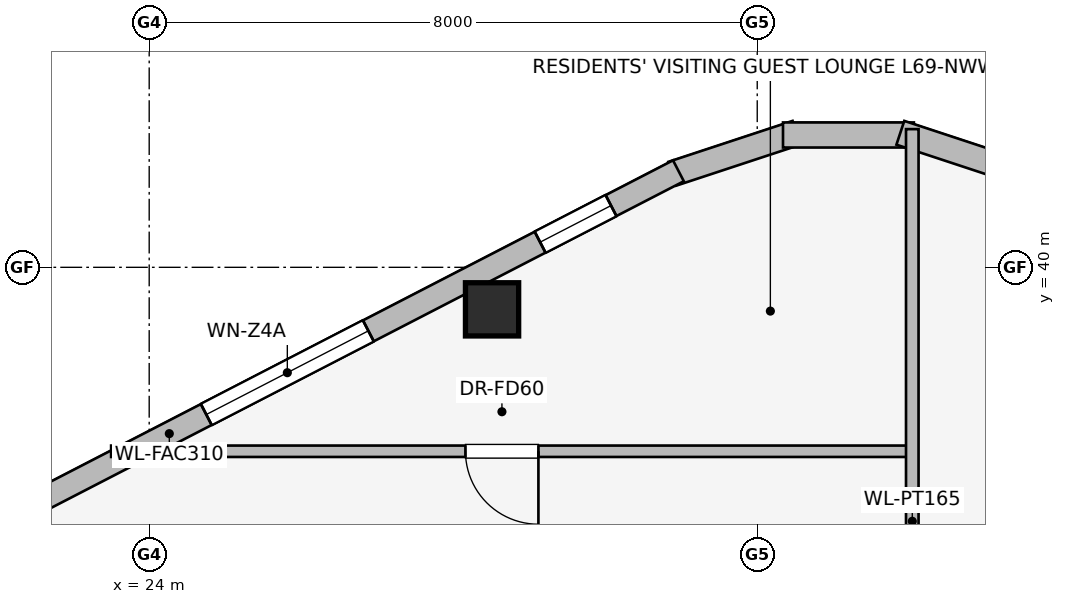
"""IFC4 building model, lengths in metres.
Left out: names, types, materials, properties, quantities, classifications, styles, units other than length and angle.
Written with IfcOpenShell. Run it as: python <this file> out.ifc"""

import sys

from ifc_helpers import new_model, si_unit, direction, frame, frame_2d, origin, origin_2d, place, context, subcontext, project, spatial, rectangle, extrude, element, fill, save


model = new_model("IFC4")
c1 = context("Model", 3, precision=1e-05, world=origin(), true_north=direction((0.0, 1.0)))
c2 = subcontext(c1, "Body", "Model", "MODEL_VIEW")
j1 = project(units=[si_unit("LENGTHUNIT", "METRE"), si_unit("PLANEANGLEUNIT", "RADIAN")], contexts=[c1])
p1 = place(None, origin())
s1 = spatial("IfcSite", under=j1, at=p1, CompositionType="ELEMENT")
p2 = place(p1, origin())
s2 = spatial("IfcBuilding", under=s1, at=p2, CompositionType="ELEMENT")
p3 = place(p2, frame((0.0, 0.0, 252.55)))
s3 = spatial("IfcBuildingStorey", under=s2, at=p3, CompositionType="ELEMENT", Elevation=252.55)
p4 = place(p3, frame((28.511, 39.447, 0.0), z_axis=(0.0, 0.0, 1.0), x_axis=(1.0, 0.0, 0.0)))
e1 = element("IfcColumn", 1, at=p4, inside=s3, PredefinedType="COLUMN", context=c2, shape_type="SweptSolid", body=[
    extrude(rectangle(XDim=0.7, YDim=0.7, at=origin_2d()), origin(), (0.0, 0.0, 1.0), 3.55),
])
p5 = place(p3, frame((30.882, 41.231, 0.0), z_axis=(0.0, 0.0, 1.0), x_axis=(0.949713440491, 0.313120393699, 0.0)))
e2 = element("IfcWall", 2, at=p5, inside=s3, PredefinedType="STANDARD", context=c2, shape_type="SweptSolid", body=[
    extrude(rectangle(XDim=1.722, YDim=0.33, at=frame_2d((0.861, 0.0))), origin(), (0.0, 0.0, 1.0), 3.29),
])
p6 = place(p3, frame((32.339, 41.741, 0.0), z_axis=(0.0, 0.0, 1.0), x_axis=(1.0, 0.0, 0.0)))
e3 = element("IfcWall", 3, at=p6, inside=s3, PredefinedType="STANDARD", context=c2, shape_type="SweptSolid", body=[
    extrude(rectangle(XDim=1.722, YDim=0.33, at=frame_2d((0.861, 0.0))), origin(), (0.0, 0.0, 1.0), 3.29),
])
p7 = place(p3, frame((33.883, 41.77, 0.0), z_axis=(0.0, 0.0, 1.0), x_axis=(0.949713440491, -0.313120393699, 0.0)))
e4 = element("IfcWall", 4, at=p7, inside=s3, PredefinedType="STANDARD", context=c2, shape_type="SweptSolid", body=[
    extrude(rectangle(XDim=1.722, YDim=0.33, at=frame_2d((0.861, 0.0))), origin(), (0.0, 0.0, 1.0), 3.29),
])
p8 = place(p3, frame((17.566, 34.354, 0.0), z_axis=(0.0, 0.0, 1.0), x_axis=(0.888581481622, 0.458718814218, 0.0)))
e5 = element("IfcWall", 5, at=p8, inside=s3, PredefinedType="STANDARD", context=c2, shape_type="SweptSolid", body=[
    extrude(rectangle(XDim=15.077, YDim=0.31, at=frame_2d((7.539, 0.0))), origin(), (0.0, 0.0, 1.0), 3.29),
])
p9 = place(p8, frame((0.998, 0.0, 0.75)))
e6 = element("IfcOpeningElement", 6, at=p9, cuts=e5, PredefinedType="OPENING", context=c2, shape_type="SweptSolid", body=[
    extrude(rectangle(XDim=1.05, YDim=1.4, at=frame_2d((0.525, 0.7))), frame((0.0, 0.165, 0.0), z_axis=(0.0, -1.0, 0.0), x_axis=(1.0, 0.0, 0.0)), (0.0, 0.0, 1.0), 0.33),
])
p10 = place(p8, frame((4.403, 0.0, 0.75)))
e7 = element("IfcOpeningElement", 7, at=p10, cuts=e5, PredefinedType="OPENING", context=c2, shape_type="SweptSolid", body=[
    extrude(rectangle(XDim=1.05, YDim=1.4, at=frame_2d((0.525, 0.7))), frame((0.0, 0.165, 0.0), z_axis=(0.0, -1.0, 0.0), x_axis=(1.0, 0.0, 0.0)), (0.0, 0.0, 1.0), 0.33),
])
p11 = place(p8, frame((8.086, 0.0, 0.75)))
e8 = element("IfcOpeningElement", 8, at=p11, cuts=e5, PredefinedType="OPENING", context=c2, shape_type="SweptSolid", body=[
    extrude(rectangle(XDim=2.4, YDim=1.6, at=frame_2d((1.2, 0.8))), frame((0.0, 0.165, 0.0), z_axis=(0.0, -1.0, 0.0), x_axis=(1.0, 0.0, 0.0)), (0.0, 0.0, 1.0), 0.33),
])
p12 = place(p8, frame((13.029, 0.0, 0.75)))
e9 = element("IfcOpeningElement", 9, at=p12, cuts=e5, PredefinedType="OPENING", context=c2, shape_type="SweptSolid", body=[
    extrude(rectangle(XDim=1.05, YDim=1.4, at=frame_2d((0.525, 0.7))), frame((0.0, 0.165, 0.0), z_axis=(0.0, -1.0, 0.0), x_axis=(1.0, 0.0, 0.0)), (0.0, 0.0, 1.0), 0.33),
])
p13 = place(p3, frame((34.0, 37.58, 0.0), z_axis=(0.0, 0.0, 1.0), x_axis=(-1.0, 0.0, 0.0)))
e10 = element("IfcWall", 10, at=p13, inside=s3, PredefinedType="PARTITIONING", context=c2, shape_type="SweptSolid", body=[
    extrude(rectangle(XDim=10.501, YDim=0.15, at=frame_2d((5.25, 0.0))), origin(), (0.0, 0.0, 1.0), 2.682),
])
p14 = place(p13, frame((4.879, 0.0, 0.0)))
e11 = element("IfcOpeningElement", 11, at=p14, cuts=e10, PredefinedType="OPENING", context=c2, shape_type="SweptSolid", body=[
    extrude(rectangle(XDim=0.96, YDim=2.0, at=frame_2d((0.48, 1.0))), frame((0.0, 0.085, 0.0), z_axis=(0.0, -1.0, 0.0), x_axis=(1.0, 0.0, 0.0)), (0.0, 0.0, 1.0), 0.17),
])
p15 = place(p3, frame((34.04, 31.5, 0.0), z_axis=(0.0, 0.0, 1.0), x_axis=(0.0, 1.0, 0.0)))
e12 = element("IfcWall", 12, at=p15, inside=s3, PredefinedType="PARTITIONING", context=c2, shape_type="SweptSolid", body=[
    extrude(rectangle(XDim=10.318, YDim=0.165, at=frame_2d((5.159, 0.0))), origin(), (0.0, 0.0, 1.0), 3.29),
])
p16 = place(p11, origin())
e13 = element("IfcWindow", 13, at=p16, inside=s3, PartitioningType="SINGLE_PANEL", PredefinedType="WINDOW", context=c2, shape_type="SweptSolid", body=[
    extrude(rectangle(XDim=2.4, YDim=1.6, at=frame_2d((1.2, 0.8))), frame((0.0, 0.03, 0.0), z_axis=(0.0, -1.0, 0.0), x_axis=(1.0, 0.0, 0.0)), (0.0, 0.0, 1.0), 0.06),
])
fill(e8, e13)
p17 = place(p12, origin())
e14 = element("IfcWindow", 14, at=p17, inside=s3, PartitioningType="SINGLE_PANEL", PredefinedType="WINDOW", context=c2, shape_type="SweptSolid", body=[
    extrude(rectangle(XDim=1.05, YDim=1.4, at=frame_2d((0.525, 0.7))), frame((0.0, 0.03, 0.0), z_axis=(0.0, -1.0, 0.0), x_axis=(1.0, 0.0, 0.0)), (0.0, 0.0, 1.0), 0.06),
])
fill(e9, e14)
p18 = place(p14, origin())
e15 = element("IfcDoor", 15, at=p18, inside=s3, OperationType="SINGLE_SWING_LEFT", PredefinedType="DOOR", context=c2, shape_type="SweptSolid", body=[
    extrude(rectangle(XDim=0.96, YDim=2.0, at=frame_2d((0.48, 1.0))), frame((0.0, 0.025, 0.0), z_axis=(0.0, -1.0, 0.0), x_axis=(1.0, 0.0, 0.0)), (0.0, 0.0, 1.0), 0.05),
])
fill(e11, e15)
save(model, sys.argv[1])
